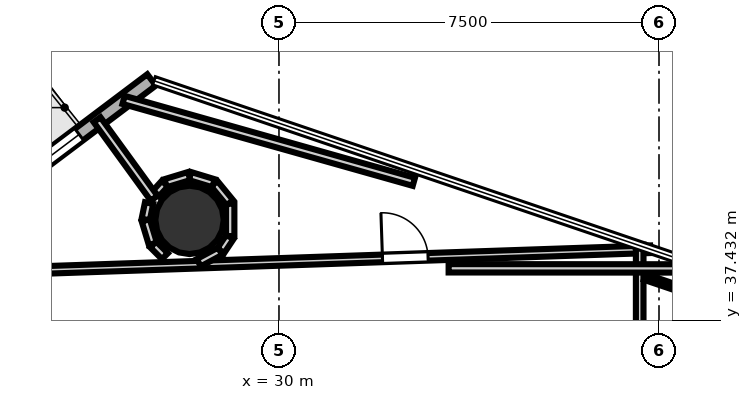
"""IFC4 building model, lengths in metres.
Left out: names, types, materials, properties, quantities, classifications, styles, units other than length and angle.
Written with IfcOpenShell. Run it as: python <this file> out.ifc"""

import sys

from ifc_helpers import new_model, si_unit, direction, frame, frame_2d, origin, origin_2d, place, context, subcontext, project, spatial, rectangle, hollow_circle, extrude, element, fill, save


model = new_model("IFC4")
c1 = context("Model", 3, precision=1e-05, world=origin(), true_north=direction((0.0, 1.0)))
c2 = subcontext(c1, "Body", "Model", "MODEL_VIEW")
j1 = project(units=[si_unit("LENGTHUNIT", "METRE"), si_unit("PLANEANGLEUNIT", "RADIAN")], contexts=[c1])
p1 = place(None, origin())
s1 = spatial("IfcSite", under=j1, at=p1, CompositionType="ELEMENT")
p2 = place(p1, origin())
s2 = spatial("IfcBuilding", under=s1, at=p2, CompositionType="ELEMENT")
p3 = place(p2, frame((0.0, 0.0, 169.8)))
s3 = spatial("IfcBuildingStorey", under=s2, at=p3, CompositionType="ELEMENT", Elevation=169.8)
p4 = place(p3, frame((28.235, 39.411, 0.0), z_axis=(0.0, 0.0, 1.0), x_axis=(1.0, 0.0, 0.0)))
e1 = element("IfcColumn", 1, at=p4, inside=s3, PredefinedType="COLUMN", context=c2, shape_type="SweptSolid", body=[
    extrude(hollow_circle(Radius=0.675, WallThickness=0.032, at=origin_2d()), origin(), (0.0, 0.0, 1.0), 3.7),
])
p5 = place(p3, frame((27.485, 42.173, 0.0), z_axis=(0.0, 0.0, 1.0), x_axis=(-0.798786424134, -0.601614701133, 0.0)))
e2 = element("IfcWall", 2, at=p5, inside=s3, PredefinedType="SOLIDWALL", context=c2, shape_type="SweptSolid", body=[
    extrude(rectangle(XDim=8.461, YDim=0.28, at=frame_2d((4.23, 0.0))), origin(), (0.0, 0.0, 1.0), 3.52),
])
p6 = place(p5, frame((1.788, 0.0, 0.85)))
e3 = element("IfcOpeningElement", 3, at=p6, cuts=e2, PredefinedType="OPENING", context=c2, shape_type="SweptSolid", body=[
    extrude(rectangle(XDim=1.5, YDim=2.1, at=frame_2d((0.75, 1.05))), frame((0.0, 0.15, 0.0), z_axis=(0.0, -1.0, 0.0), x_axis=(1.0, 0.0, 0.0)), (0.0, 0.0, 1.0), 0.3),
])
p7 = place(p3, frame((22.349, 38.32, 0.0), z_axis=(0.0, 0.0, 1.0), x_axis=(0.999416305401, 0.03416209155, 0.0)))
e4 = element("IfcWall", 4, at=p7, inside=s3, PredefinedType="PARTITIONING", context=c2, shape_type="SweptSolid", body=[
    extrude(rectangle(XDim=14.986, YDim=0.15, at=frame_2d((7.493, 0.0))), origin(), (0.0, 0.0, 1.0), 2.84),
])
p8 = place(p7, frame((9.699, 0.0, 0.0)))
e5 = element("IfcOpeningElement", 5, at=p8, cuts=e4, PredefinedType="OPENING", context=c2, shape_type="SweptSolid", body=[
    extrude(rectangle(XDim=0.9, YDim=2.1, at=frame_2d((0.45, 1.05))), frame((0.0, 0.085, 0.0), z_axis=(0.0, -1.0, 0.0), x_axis=(1.0, 0.0, 0.0)), (0.0, 0.0, 1.0), 0.17),
])
p9 = place(p3, frame((37.119, 38.922, 0.0), z_axis=(0.0, 0.0, 1.0), x_axis=(0.0, -1.0, 0.0)))
e6 = element("IfcWall", 6, at=p9, inside=s3, PredefinedType="PARTITIONING", context=c2, shape_type="SweptSolid", body=[
    extrude(rectangle(XDim=3.362, YDim=0.15, at=frame_2d((1.681, 0.0))), origin(), (0.0, 0.0, 1.0), 2.84),
])
p10 = place(p3, frame((37.22, 38.286, 0.0), z_axis=(0.0, 0.0, 1.0), x_axis=(0.946917915535, -0.321475444224, 0.0)))
e7 = element("IfcWall", 7, at=p10, inside=s3, PredefinedType="PARTITIONING", context=c2, shape_type="SweptSolid", body=[
    extrude(rectangle(XDim=4.671, YDim=0.12, at=frame_2d((2.336, 0.0))), origin(), (0.0, 0.0, 1.0), 2.84),
])
p11 = place(p3, frame((28.417, 38.566, 0.0), z_axis=(0.0, 0.0, 1.0), x_axis=(0.881139600532, 0.472856219558, 0.0)))
e8 = element("IfcWall", 8, at=p11, inside=s3, PredefinedType="PLUMBINGWALL", context=c2, shape_type="SweptSolid", body=[
    extrude(rectangle(XDim=0.48, YDim=0.165, at=frame_2d((0.24, 0.0))), origin(), (0.0, 0.0, 1.0), 2.84),
])
p12 = place(p3, frame((28.851, 38.803, 0.0), z_axis=(0.0, 0.0, 1.0), x_axis=(0.555218822922, 0.83170430964, 0.0)))
e9 = element("IfcWall", 9, at=p12, inside=s3, PredefinedType="PLUMBINGWALL", context=c2, shape_type="SweptSolid", body=[
    extrude(rectangle(XDim=0.326, YDim=0.165, at=frame_2d((0.163, 0.0))), origin(), (0.0, 0.0, 1.0), 2.84),
])
p13 = place(p3, frame((29.037, 39.092, 0.0), z_axis=(0.0, 0.0, 1.0), x_axis=(0.0, 1.0, 0.0)))
e10 = element("IfcWall", 10, at=p13, inside=s3, PredefinedType="PLUMBINGWALL", context=c2, shape_type="SweptSolid", body=[
    extrude(rectangle(XDim=0.639, YDim=0.165, at=frame_2d((0.319, 0.0))), origin(), (0.0, 0.0, 1.0), 2.84),
])
for number, where, z_axis, x_axis in (
    (11, (29.031, 39.75, 0.0), (0.0, 0.0, 1.0), (-0.634, 0.773, 0.0)),
    (12, (28.708, 40.135, 0.0), (0.0, 0.0, 1.0), (-0.957, 0.29, 0.0)),
):
    element("IfcWall", number, at=place(p3, frame(where, z_axis=z_axis, x_axis=x_axis)), inside=s3, PredefinedType="PLUMBINGWALL", context=c2, shape_type="SweptSolid", body=[
        extrude(rectangle(XDim=0.485, YDim=0.165, at=frame_2d((0.242, 0.0))), origin(), (0.0, 0.0, 1.0), 2.84),
    ])
p14 = place(p3, frame((28.226, 40.276, 0.0), z_axis=(0.0, 0.0, 1.0), x_axis=(-0.956990508633, -0.29011922788, 0.0)))
e13 = element("IfcWall", 13, at=p14, inside=s3, PredefinedType="PLUMBINGWALL", context=c2, shape_type="SweptSolid", body=[
    extrude(rectangle(XDim=0.485, YDim=0.165, at=frame_2d((0.242, 0.0))), origin(), (0.0, 0.0, 1.0), 2.84),
])
p15 = place(p3, frame((27.748, 40.126, 0.0), z_axis=(0.0, 0.0, 1.0), x_axis=(-0.673275127823, -0.739392049089, 0.0)))
e14 = element("IfcWall", 14, at=p15, inside=s3, PredefinedType="PLUMBINGWALL", context=c2, shape_type="SweptSolid", body=[
    extrude(rectangle(XDim=0.262, YDim=0.165, at=frame_2d((0.131, 0.0))), origin(), (0.0, 0.0, 1.0), 2.84),
])
p16 = place(p3, frame((27.536, 39.838, 0.0), z_axis=(0.0, 0.0, 1.0), x_axis=(-0.587823187108, 0.808989431759, 0.0)))
e15 = element("IfcWall", 15, at=p16, inside=s3, PredefinedType="PLUMBINGWALL", context=c2, shape_type="SweptSolid", body=[
    extrude(rectangle(XDim=1.916, YDim=0.165, at=frame_2d((0.958, 0.0))), origin(), (0.0, 0.0, 1.0), 2.84),
])
p17 = place(p3, frame((26.934, 41.778, 0.0), z_axis=(0.0, 0.0, 1.0), x_axis=(0.962422740624, -0.271555644997, 0.0)))
e16 = element("IfcWall", 16, at=p17, inside=s3, PredefinedType="PLUMBINGWALL", context=c2, shape_type="SweptSolid", body=[
    extrude(rectangle(XDim=5.952, YDim=0.165, at=frame_2d((2.976, 0.0))), origin(), (0.0, 0.0, 1.0), 2.84),
])
p18 = place(p3, frame((38.463, 38.453, 0.0), z_axis=(0.0, 0.0, 1.0), x_axis=(-0.999999835954, 0.000572792269, 0.0)))
e17 = element("IfcWall", 17, at=p18, inside=s3, PredefinedType="PLUMBINGWALL", context=c2, shape_type="SweptSolid", body=[
    extrude(rectangle(XDim=5.115, YDim=0.165, at=frame_2d((2.557, 0.0))), origin(), (0.0, 0.0, 1.0), 2.84),
])
p19 = place(p3, frame((27.437, 39.744, 0.0), z_axis=(0.0, 0.0, 1.0), x_axis=(-0.202169592815, -0.979350527514, 0.0)))
e18 = element("IfcWall", 18, at=p19, inside=s3, PredefinedType="PLUMBINGWALL", context=c2, shape_type="SweptSolid", body=[
    extrude(rectangle(XDim=0.333, YDim=0.165, at=frame_2d((0.167, 0.0))), origin(), (0.0, 0.0, 1.0), 2.84),
])
p20 = place(p3, frame((27.37, 39.402, 0.0), z_axis=(0.0, 0.0, 1.0), x_axis=(0.289979449985, -0.95703287226, 0.0)))
e19 = element("IfcWall", 19, at=p20, inside=s3, PredefinedType="PLUMBINGWALL", context=c2, shape_type="SweptSolid", body=[
    extrude(rectangle(XDim=0.485, YDim=0.165, at=frame_2d((0.242, 0.0))), origin(), (0.0, 0.0, 1.0), 2.84),
])
p21 = place(p3, frame((27.519, 38.925, 0.0), z_axis=(0.0, 0.0, 1.0), x_axis=(0.707106781187, -0.707106781187, 0.0)))
e20 = element("IfcWall", 20, at=p21, inside=s3, PredefinedType="PLUMBINGWALL", context=c2, shape_type="SweptSolid", body=[
    extrude(rectangle(XDim=0.326, YDim=0.165, at=frame_2d((0.163, 0.0))), origin(), (0.0, 0.0, 1.0), 2.84),
])
p22 = place(p8, origin())
e21 = element("IfcDoor", 21, at=p22, inside=s3, OperationType="SINGLE_SWING_LEFT", PredefinedType="DOOR", context=c2, shape_type="SweptSolid", body=[
    extrude(rectangle(XDim=0.9, YDim=2.1, at=frame_2d((0.45, 1.05))), frame((0.0, 0.025, 0.0), z_axis=(0.0, -1.0, 0.0), x_axis=(1.0, 0.0, 0.0)), (0.0, 0.0, 1.0), 0.05),
])
fill(e5, e21)
p23 = place(p6, origin())
e22 = element("IfcWindow", 22, at=p23, inside=s3, PartitioningType="SINGLE_PANEL", PredefinedType="WINDOW", context=c2, shape_type="SweptSolid", body=[
    extrude(rectangle(XDim=1.5, YDim=2.1, at=frame_2d((0.75, 1.05))), frame((0.0, 0.03, 0.0), z_axis=(0.0, -1.0, 0.0), x_axis=(1.0, 0.0, 0.0)), (0.0, 0.0, 1.0), 0.06),
])
fill(e3, e22)
save(model, sys.argv[1])
